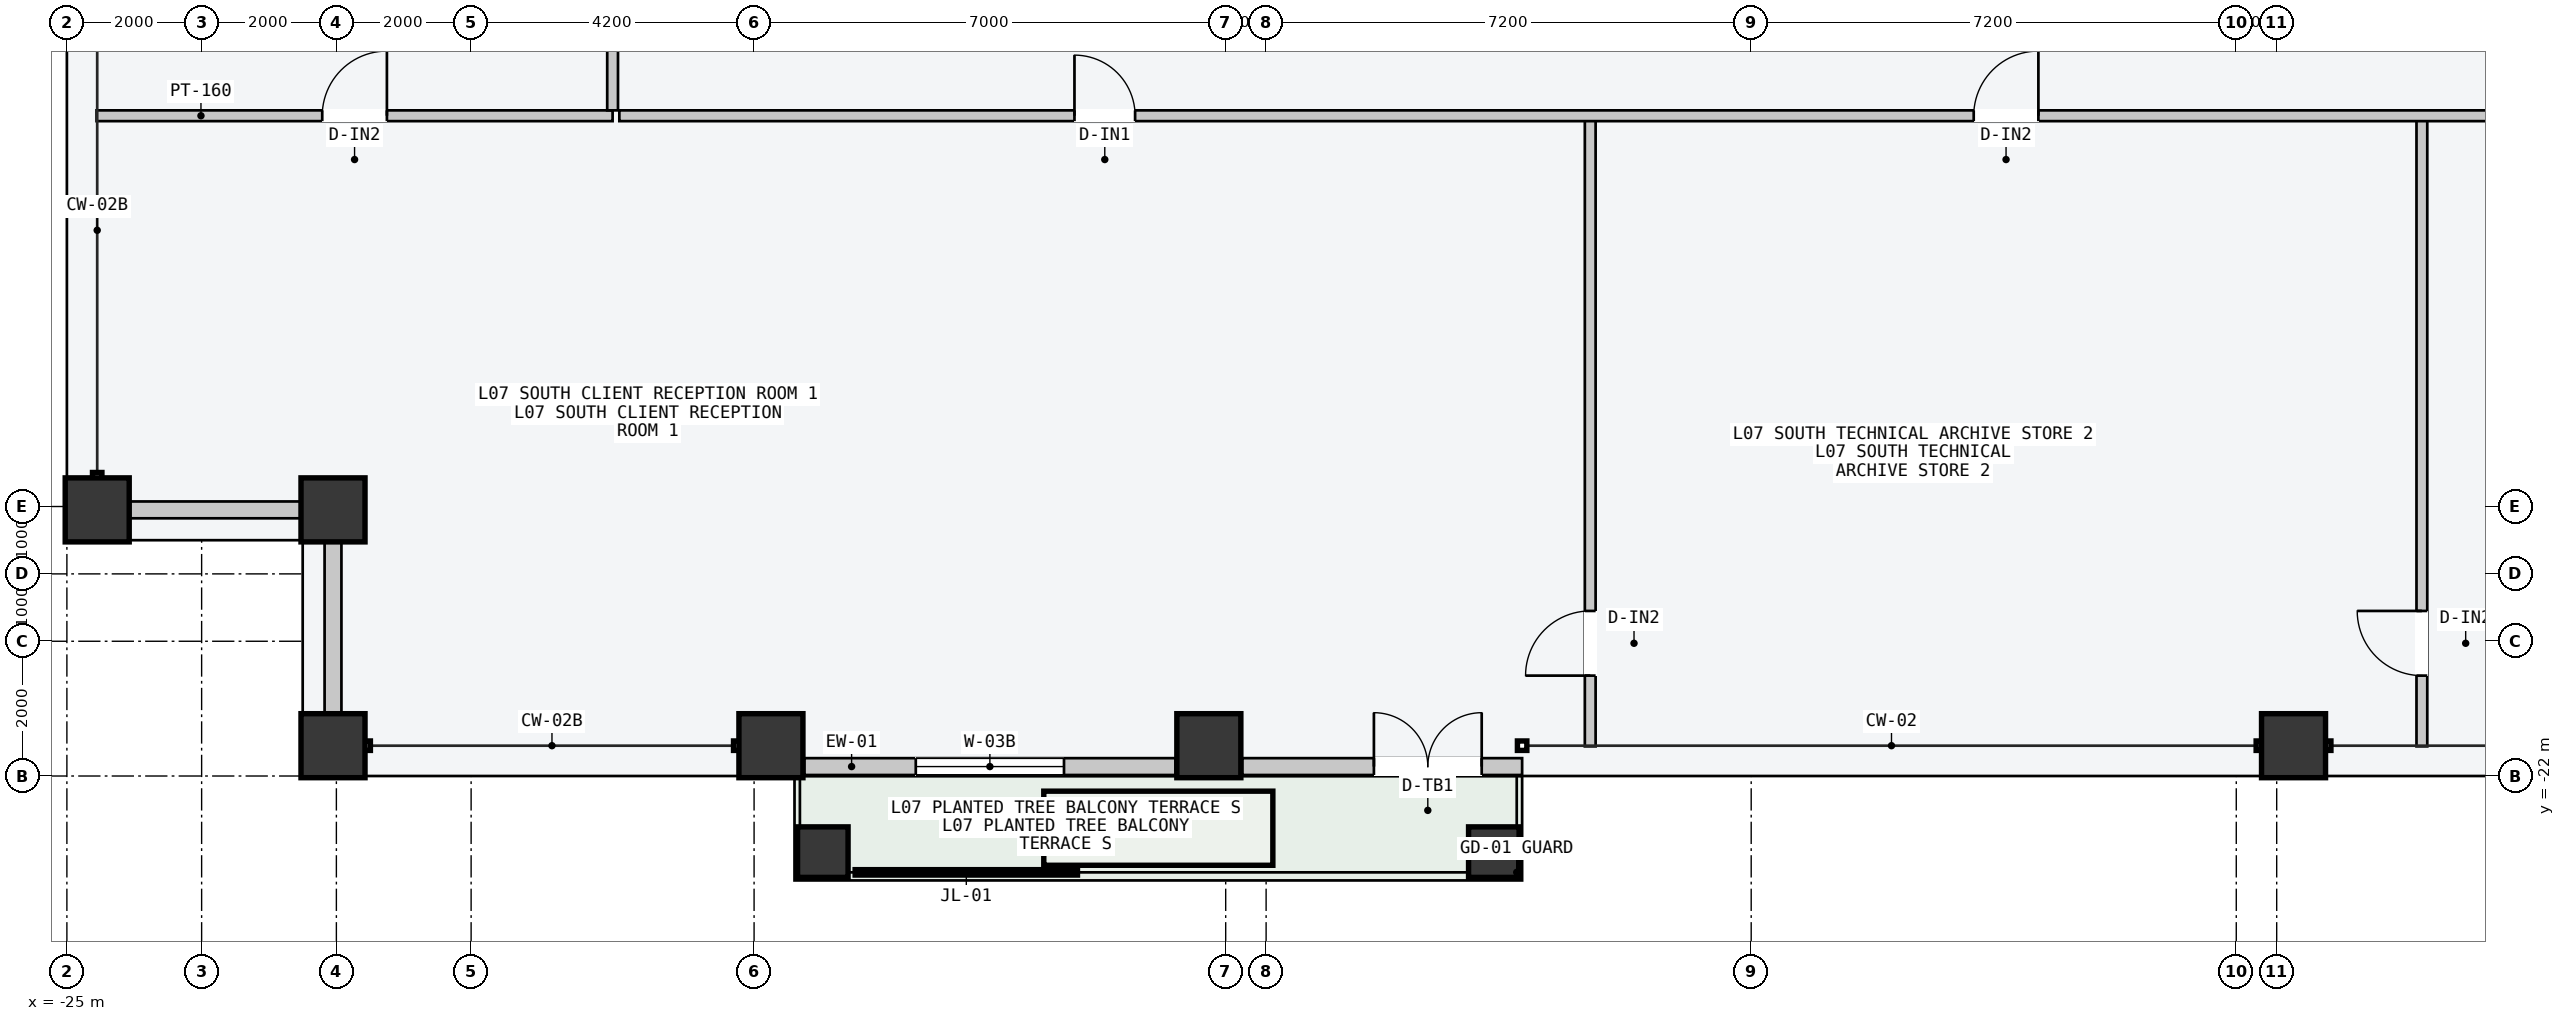
"""IFC4 building model, lengths in metres.
Left out: names, types, materials, properties, quantities, classifications, styles, units other than length and angle.
Written with IfcOpenShell. Run it as: python <this file> out.ifc"""

import sys

from ifc_helpers import new_model, si_unit, direction, frame, frame_2d, origin, origin_2d, place, context, subcontext, project, spatial, rectangle, hollow_rectangle, extrude, element, fill, save


model = new_model("IFC4")
c1 = context("Model", 3, precision=1e-05, world=origin(), true_north=direction((0.0, 1.0)))
c2 = subcontext(c1, "Body", "Model", "MODEL_VIEW")
j1 = project(units=[si_unit("LENGTHUNIT", "METRE"), si_unit("PLANEANGLEUNIT", "RADIAN")], contexts=[c1])
p1 = place(None, origin())
s1 = spatial("IfcSite", under=j1, at=p1, CompositionType="ELEMENT")
p2 = place(p1, origin())
s2 = spatial("IfcBuilding", under=s1, at=p2, CompositionType="ELEMENT")
p3 = place(p2, frame((0.0, 0.0, 31.2)))
s3 = spatial("IfcBuildingStorey", under=s2, at=p3, CompositionType="ELEMENT", Elevation=31.2)
for number, where, z_axis, x_axis in (
    (1, (-21.05, -21.55, 0.0), (0.0, 0.0, 1.0), (1.0, 0.0, 0.0)),
    (2, (-14.55, -21.55, 0.0), (0.0, 0.0, 1.0), (1.0, 0.0, 0.0)),
    (3, (-8.05, -21.55, 0.0), (0.0, 0.0, 1.0), (1.0, 0.0, 0.0)),
    (4, (8.05, -21.55, 0.0), (0.0, 0.0, 1.0), (1.0, 0.0, 0.0)),
    (5, (-24.55, -18.05, 0.0), (0.0, 0.0, 1.0), (0.0, 1.0, 0.0)),
    (6, (-21.05, -18.05, 0.0), (0.0, 0.0, 1.0), (1.0, 0.0, 0.0)),
):
    element("IfcColumn", number, at=place(p3, frame(where, z_axis=z_axis, x_axis=x_axis)), inside=s3, PredefinedType="COLUMN", context=c2, shape_type="SweptSolid", body=[
        extrude(hollow_rectangle(XDim=0.95, YDim=0.95, WallThickness=0.048, at=origin_2d()), origin(), (0.0, 0.0, 1.0), 3.6),
    ])
for number, where, z_axis, x_axis in (
    (7, (-13.78, -23.13, 0.0), (0.0, 0.0, 1.0), (1.0, 0.0, 0.0)),
    (8, (-3.82, -23.13, 0.0), (0.0, 0.0, 1.0), (1.0, 0.0, 0.0)),
):
    element("IfcColumn", number, at=place(p3, frame(where, z_axis=z_axis, x_axis=x_axis)), inside=s3, PredefinedType="COLUMN", context=c2, shape_type="SweptSolid", body=[
        extrude(hollow_rectangle(XDim=0.75, YDim=0.75, WallThickness=0.032, at=origin_2d()), origin(), (0.0, 0.0, 1.0), 3.6),
    ])
p4 = place(p3, frame((-14.055, -21.86, 0.0), z_axis=(0.0, 0.0, 1.0), x_axis=(1.0, 0.0, 0.0)))
e9 = element("IfcWall", 9, at=p4, inside=s3, PredefinedType="STANDARD", context=c2, shape_type="SweptSolid", body=[
    extrude(rectangle(XDim=5.51, YDim=0.25, at=frame_2d((2.755, 0.0))), origin(), (0.0, 0.0, 1.0), 3.4),
])
p5 = place(p4, frame((1.655, 0.0, 0.85)))
e10 = element("IfcOpeningElement", 10, at=p5, cuts=e9, PredefinedType="OPENING", context=c2, shape_type="SweptSolid", body=[
    extrude(rectangle(XDim=2.2, YDim=2.1, at=frame_2d((1.1, 1.05))), frame((0.0, 0.135, 0.0), z_axis=(0.0, -1.0, 0.0), x_axis=(1.0, 0.0, 0.0)), (0.0, 0.0, 1.0), 0.27),
])
p6 = place(p3, frame((-7.555, -21.86, 0.0), z_axis=(0.0, 0.0, 1.0), x_axis=(1.0, 0.0, 0.0)))
e11 = element("IfcWall", 11, at=p6, inside=s3, PredefinedType="STANDARD", context=c2, shape_type="SweptSolid", body=[
    extrude(rectangle(XDim=4.155, YDim=0.25, at=frame_2d((2.078, 0.0))), origin(), (0.0, 0.0, 1.0), 3.4),
])
p7 = place(p6, frame((1.955, 0.0, 0.0)))
e12 = element("IfcOpeningElement", 12, at=p7, cuts=e11, PredefinedType="OPENING", context=c2, shape_type="SweptSolid", body=[
    extrude(rectangle(XDim=1.6, YDim=2.2, at=frame_2d((0.8, 1.1))), frame((0.0, 0.135, 0.0), z_axis=(0.0, -1.0, 0.0), x_axis=(1.0, 0.0, 0.0)), (0.0, 0.0, 1.0), 0.27),
])
for number, where, z_axis, x_axis in (
    (13, (-24.065, -18.05, 0.0), (0.0, 0.0, 1.0), (1.0, 0.0, 0.0)),
    (14, (-21.05, -21.065, 0.0), (0.0, 0.0, 1.0), (0.0, 1.0, 0.0)),
):
    element("IfcWall", number, at=place(p3, frame(where, z_axis=z_axis, x_axis=x_axis)), inside=s3, PredefinedType="STANDARD", context=c2, shape_type="SweptSolid", body=[
        extrude(rectangle(XDim=2.53, YDim=0.25, at=frame_2d((1.265, 0.0))), origin(), (0.0, 0.0, 1.0), 2.7),
    ])
p8 = place(p3, frame((-2.389, -21.56, 0.0), z_axis=(0.0, 0.0, 1.0), x_axis=(0.0, 1.0, 0.0)))
e15 = element("IfcWall", 15, at=p8, inside=s3, PredefinedType="PARTITIONING", context=c2, shape_type="SweptSolid", body=[
    extrude(rectangle(XDim=9.3, YDim=0.16, at=frame_2d((4.65, 0.0))), origin(), (0.0, 0.0, 1.0), 3.4),
])
p9 = place(p8, frame((1.05, 0.0, 0.0)))
e16 = element("IfcOpeningElement", 16, at=p9, cuts=e15, PredefinedType="OPENING", context=c2, shape_type="SweptSolid", body=[
    extrude(rectangle(XDim=0.96, YDim=2.18, at=frame_2d((0.48, 1.09))), frame((0.0, 0.09, 0.0), z_axis=(0.0, -1.0, 0.0), x_axis=(1.0, 0.0, 0.0)), (0.0, 0.0, 1.0), 0.18),
])
p10 = place(p3, frame((9.955, -21.56, 0.0), z_axis=(0.0, 0.0, 1.0), x_axis=(0.0, 1.0, 0.0)))
e17 = element("IfcWall", 17, at=p10, inside=s3, PredefinedType="PARTITIONING", context=c2, shape_type="SweptSolid", body=[
    extrude(rectangle(XDim=9.3, YDim=0.16, at=frame_2d((4.65, 0.0))), origin(), (0.0, 0.0, 1.0), 3.4),
])
p11 = place(p10, frame((1.05, 0.0, 0.0)))
e18 = element("IfcOpeningElement", 18, at=p11, cuts=e17, PredefinedType="OPENING", context=c2, shape_type="SweptSolid", body=[
    extrude(rectangle(XDim=0.96, YDim=2.18, at=frame_2d((0.48, 1.09))), frame((0.0, 0.09, 0.0), z_axis=(0.0, -1.0, 0.0), x_axis=(1.0, 0.0, 0.0)), (0.0, 0.0, 1.0), 0.18),
])
p12 = place(p3, frame((-16.8, -12.2, 0.0), z_axis=(0.0, 0.0, 1.0), x_axis=(1.0, 0.0, 0.0)))
e19 = element("IfcWall", 19, at=p12, inside=s3, PredefinedType="PARTITIONING", context=c2, shape_type="SweptSolid", body=[
    extrude(rectangle(XDim=33.6, YDim=0.16, at=frame_2d((16.8, 0.0))), origin(), (0.0, 0.0, 1.0), 3.4),
])
p13 = place(p12, frame((6.755, 0.0, 0.0)))
e20 = element("IfcOpeningElement", 20, at=p13, cuts=e19, PredefinedType="OPENING", context=c2, shape_type="SweptSolid", body=[
    extrude(rectangle(XDim=0.9, YDim=2.15, at=frame_2d((0.45, 1.075))), frame((0.0, 0.09, 0.0), z_axis=(0.0, -1.0, 0.0), x_axis=(1.0, 0.0, 0.0)), (0.0, 0.0, 1.0), 0.18),
])
p14 = place(p12, frame((20.103, 0.0, 0.0)))
e21 = element("IfcOpeningElement", 21, at=p14, cuts=e19, PredefinedType="OPENING", context=c2, shape_type="SweptSolid", body=[
    extrude(rectangle(XDim=0.96, YDim=2.18, at=frame_2d((0.48, 1.09))), frame((0.0, 0.09, 0.0), z_axis=(0.0, -1.0, 0.0), x_axis=(1.0, 0.0, 0.0)), (0.0, 0.0, 1.0), 0.18),
])
p15 = place(p12, frame((29.667, 0.0, 0.0)))
e22 = element("IfcOpeningElement", 22, at=p15, cuts=e19, PredefinedType="OPENING", context=c2, shape_type="SweptSolid", body=[
    extrude(rectangle(XDim=1.02, YDim=2.2, at=frame_2d((0.51, 1.1))), frame((0.0, 0.09, 0.0), z_axis=(0.0, -1.0, 0.0), x_axis=(1.0, 0.0, 0.0)), (0.0, 0.0, 1.0), 0.18),
])
p16 = place(p3, frame((-24.56, -12.2, 0.0), z_axis=(0.0, 0.0, 1.0), x_axis=(1.0, 0.0, 0.0)))
e23 = element("IfcWall", 23, at=p16, inside=s3, PredefinedType="PARTITIONING", context=c2, shape_type="SweptSolid", body=[
    extrude(rectangle(XDim=7.66, YDim=0.16, at=frame_2d((3.83, 0.0))), origin(), (0.0, 0.0, 1.0), 3.4),
])
p17 = place(p16, frame((3.35, 0.0, 0.0)))
e24 = element("IfcOpeningElement", 24, at=p17, cuts=e23, PredefinedType="OPENING", context=c2, shape_type="SweptSolid", body=[
    extrude(rectangle(XDim=0.96, YDim=2.18, at=frame_2d((0.48, 1.09))), frame((0.0, 0.09, 0.0), z_axis=(0.0, -1.0, 0.0), x_axis=(1.0, 0.0, 0.0)), (0.0, 0.0, 1.0), 0.18),
])
p18 = place(p3, frame((-16.9, -12.12, 0.0), z_axis=(0.0, 0.0, 1.0), x_axis=(0.0, 1.0, 0.0)))
e25 = element("IfcWall", 25, at=p18, inside=s3, PredefinedType="PARTITIONING", context=c2, shape_type="SweptSolid", body=[
    extrude(rectangle(XDim=24.24, YDim=0.16, at=frame_2d((12.12, 0.0))), origin(), (0.0, 0.0, 1.0), 3.4),
])
p19 = place(p18, frame((11.5, 0.0, 0.0)))
e26 = element("IfcOpeningElement", 26, at=p19, cuts=e25, PredefinedType="OPENING", context=c2, shape_type="SweptSolid", body=[
    extrude(rectangle(XDim=1.24, YDim=2.24, at=frame_2d((0.62, 1.12))), frame((0.0, 0.09, 0.0), z_axis=(0.0, -1.0, 0.0), x_axis=(1.0, 0.0, 0.0)), (0.0, 0.0, 1.0), 0.18),
])
p20 = place(p5, origin())
e27 = element("IfcWindow", 27, at=p20, inside=s3, PartitioningType="SINGLE_PANEL", PredefinedType="WINDOW", context=c2, shape_type="SweptSolid", body=[
    extrude(rectangle(XDim=2.2, YDim=2.1, at=frame_2d((1.1, 1.05))), frame((0.0, 0.03, 0.0), z_axis=(0.0, -1.0, 0.0), x_axis=(1.0, 0.0, 0.0)), (0.0, 0.0, 1.0), 0.06),
])
fill(e10, e27)
p21 = place(p7, origin())
e28 = element("IfcDoor", 28, at=p21, inside=s3, OperationType="DOUBLE_DOOR_SINGLE_SWING", PredefinedType="DOOR", context=c2, shape_type="SweptSolid", body=[
    extrude(rectangle(XDim=1.6, YDim=2.2, at=frame_2d((0.8, 1.1))), frame((0.0, 0.025, 0.0), z_axis=(0.0, -1.0, 0.0), x_axis=(1.0, 0.0, 0.0)), (0.0, 0.0, 1.0), 0.05),
])
fill(e12, e28)
p22 = place(p9, origin())
e29 = element("IfcDoor", 29, at=p22, inside=s3, OperationType="SINGLE_SWING_LEFT", PredefinedType="DOOR", context=c2, shape_type="SweptSolid", body=[
    extrude(rectangle(XDim=0.96, YDim=2.18, at=frame_2d((0.48, 1.09))), frame((0.0, 0.025, 0.0), z_axis=(0.0, -1.0, 0.0), x_axis=(1.0, 0.0, 0.0)), (0.0, 0.0, 1.0), 0.05),
])
fill(e16, e29)
p23 = place(p11, origin())
e30 = element("IfcDoor", 30, at=p23, inside=s3, OperationType="SINGLE_SWING_RIGHT", PredefinedType="DOOR", context=c2, shape_type="SweptSolid", body=[
    extrude(rectangle(XDim=0.96, YDim=2.18, at=frame_2d((0.48, 1.09))), frame((0.0, 0.025, 0.0), z_axis=(0.0, -1.0, 0.0), x_axis=(1.0, 0.0, 0.0)), (0.0, 0.0, 1.0), 0.05),
])
fill(e18, e30)
p24 = place(p13, origin())
e31 = element("IfcDoor", 31, at=p24, inside=s3, OperationType="SINGLE_SWING_LEFT", PredefinedType="DOOR", context=c2, shape_type="SweptSolid", body=[
    extrude(rectangle(XDim=0.9, YDim=2.15, at=frame_2d((0.45, 1.075))), frame((0.0, 0.025, 0.0), z_axis=(0.0, -1.0, 0.0), x_axis=(1.0, 0.0, 0.0)), (0.0, 0.0, 1.0), 0.05),
])
fill(e20, e31)
p25 = place(p14, origin())
e32 = element("IfcDoor", 32, at=p25, inside=s3, OperationType="SINGLE_SWING_RIGHT", PredefinedType="DOOR", context=c2, shape_type="SweptSolid", body=[
    extrude(rectangle(XDim=0.96, YDim=2.18, at=frame_2d((0.48, 1.09))), frame((0.0, 0.025, 0.0), z_axis=(0.0, -1.0, 0.0), x_axis=(1.0, 0.0, 0.0)), (0.0, 0.0, 1.0), 0.05),
])
fill(e21, e32)
p26 = place(p17, origin())
e33 = element("IfcDoor", 33, at=p26, inside=s3, OperationType="SINGLE_SWING_RIGHT", PredefinedType="DOOR", context=c2, shape_type="SweptSolid", body=[
    extrude(rectangle(XDim=0.96, YDim=2.18, at=frame_2d((0.48, 1.09))), frame((0.0, 0.025, 0.0), z_axis=(0.0, -1.0, 0.0), x_axis=(1.0, 0.0, 0.0)), (0.0, 0.0, 1.0), 0.05),
])
fill(e24, e33)
save(model, sys.argv[1])
